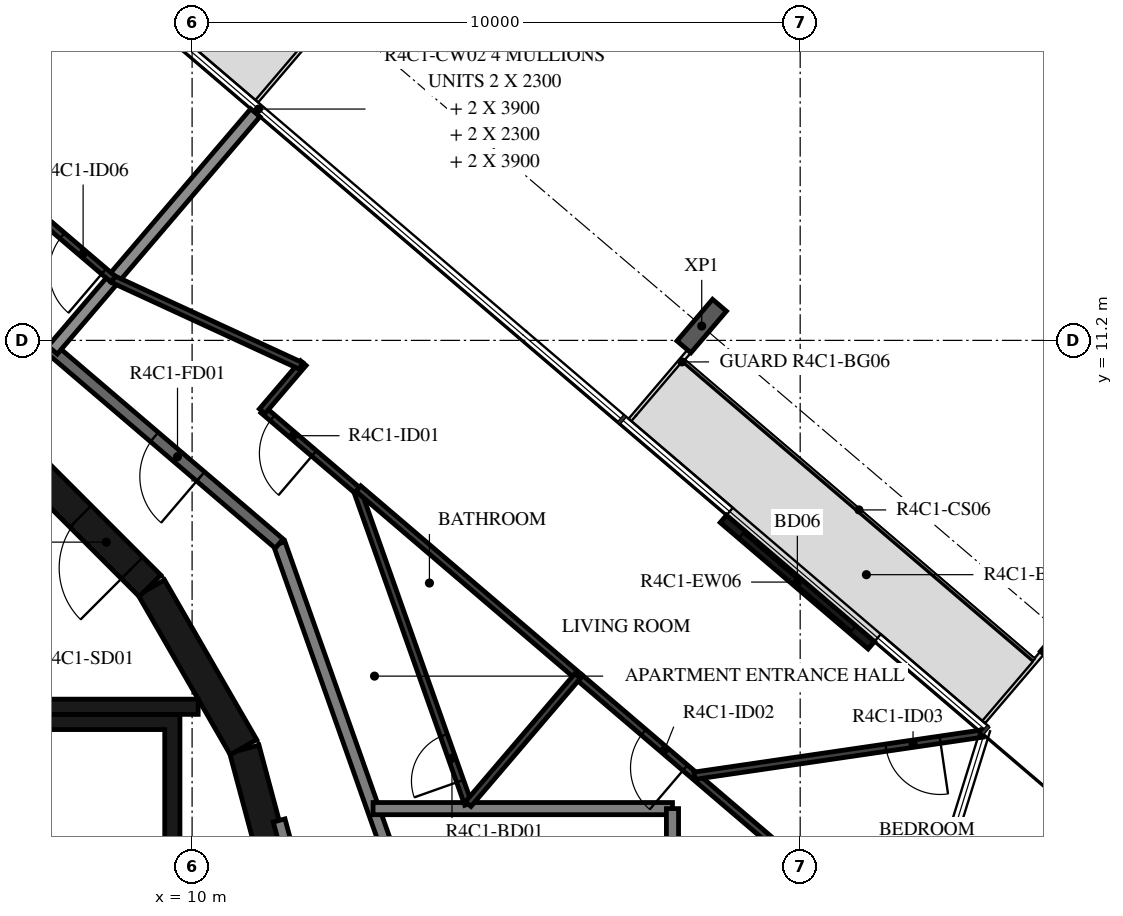
"""IFC4 building model, lengths in metres.
Left out: names, types, materials, properties, quantities, classifications, styles, units other than length and angle.
Written with IfcOpenShell. Run it as: python <this file> out.ifc"""

import sys

from ifc_helpers import new_model, si_unit, direction, frame, frame_2d, origin, origin_2d, place, context, subcontext, project, spatial, polyline, rectangle, i_section, outline, extrude, element, fill, save


model = new_model("IFC4")
c1 = context("Model", 3, precision=1e-05, world=origin(), true_north=direction((0.0, 1.0)))
c2 = subcontext(c1, "Body", "Model", "MODEL_VIEW")
j1 = project(units=[si_unit("LENGTHUNIT", "METRE"), si_unit("PLANEANGLEUNIT", "RADIAN")], contexts=[c1])
p1 = place(None, origin())
s1 = spatial("IfcSite", under=j1, at=p1, CompositionType="ELEMENT")
p2 = place(p1, origin())
s2 = spatial("IfcBuilding", under=s1, at=p2, CompositionType="ELEMENT")
p3 = place(p2, frame((0.0, 0.0, 176.2)))
s3 = spatial("IfcBuildingStorey", under=s2, at=p3, CompositionType="ELEMENT", Elevation=176.2)
for number, where, z_axis, x_axis in (
    (1, (24.358, 6.331, -0.38), (0.0, 0.0, 1.0), (0.76, -0.649, 0.0)),
    (2, (18.381, 11.436, -0.38), (0.0, 0.0, 1.0), (0.76, -0.649, 0.0)),
):
    element("IfcColumn", number, at=place(p3, frame(where, z_axis=z_axis, x_axis=x_axis)), inside=s3, PredefinedType="COLUMN", context=c2, shape_type="SweptSolid", body=[
        extrude(i_section(OverallWidth=0.3, OverallDepth=0.9, WebThickness=0.019, FlangeThickness=0.035, FilletRadius=0.03, at=origin_2d()), origin(), (0.0, 0.0, 1.0), 3.5),
    ])
p4 = place(p3, frame((21.17, 6.186, 0.0), z_axis=(0.0, 0.0, 1.0), x_axis=(-0.760359548534, 0.649502391799, 0.0)))
e3 = element("IfcWall", 3, at=p4, inside=s3, PredefinedType="STANDARD", context=c2, shape_type="SweptSolid", body=[
    extrude(rectangle(XDim=3.2, YDim=0.16, at=frame_2d((1.6, 0.0))), origin(), (0.0, 0.0, 1.0), 3.12),
])
p5 = place(p4, frame((0.4, 0.0, 0.0)))
e4 = element("IfcOpeningElement", 4, at=p5, cuts=e3, PredefinedType="OPENING", context=c2, shape_type="SweptSolid", body=[
    extrude(rectangle(XDim=2.4, YDim=2.4, at=frame_2d((1.2, 1.2))), frame((0.0, 0.09, 0.0), z_axis=(0.0, -1.0, 0.0), x_axis=(1.0, 0.0, 0.0)), (0.0, 0.0, 1.0), 0.18),
])
for number, where, z_axis, x_axis in (
    (5, (11.643, 1.55, 0.0), (0.0, 0.0, 1.0), (-0.259, 0.966, 0.0)),
    (6, (10.845, 4.51, 0.0), (0.0, 0.0, 1.0), (-0.5, 0.866, 0.0)),
):
    element("IfcWall", number, at=place(p3, frame(where, z_axis=z_axis, x_axis=x_axis)), inside=s3, PredefinedType="SHEAR", context=c2, shape_type="SweptSolid", body=[
        extrude(rectangle(XDim=3.033, YDim=0.5, at=frame_2d((1.516, 0.0))), origin(), (0.0, 0.0, 1.0), 3.12),
    ])
p6 = place(p3, frame((9.308, 7.164, 0.0), z_axis=(0.0, 0.0, 1.0), x_axis=(-0.707106781187, 0.707106781187, 0.0)))
e7 = element("IfcWall", 7, at=p6, inside=s3, PredefinedType="SHEAR", context=c2, shape_type="SweptSolid", body=[
    extrude(rectangle(XDim=3.032, YDim=0.5, at=frame_2d((1.516, 0.0))), origin(), (0.0, 0.0, 1.0), 3.12),
])
p7 = place(p6, frame((0.416, 0.0, 0.0)))
e8 = element("IfcOpeningElement", 8, at=p7, cuts=e7, PredefinedType="OPENING", context=c2, shape_type="SweptSolid", body=[
    extrude(rectangle(XDim=1.2, YDim=2.1, at=frame_2d((0.6, 1.05))), frame((0.0, 0.26, 0.0), z_axis=(0.0, -1.0, 0.0), x_axis=(1.0, 0.0, 0.0)), (0.0, 0.0, 1.0), 0.52),
])
p8 = place(p3, frame((7.0, 5.175, 0.0), z_axis=(0.0, 0.0, 1.0), x_axis=(1.0, 0.0, 0.0)))
e9 = element("IfcWall", 9, at=p8, inside=s3, PredefinedType="SHEAR", context=c2, shape_type="SweptSolid", body=[
    extrude(rectangle(XDim=3.1, YDim=0.25, at=frame_2d((1.55, 0.0))), origin(), (0.0, 0.0, 1.0), 3.12),
])
p9 = place(p3, origin())
e10 = element("IfcWall", 10, at=p9, inside=s3, PredefinedType="SHEAR", context=c2, shape_type="SweptSolid", body=[
    extrude(outline(polyline([(-9.55, 4.8), (-1.2, 4.8), (-1.2, 1.9), (-0.95, 1.9), (-0.95, 4.8), (0.95, 4.8), (0.95, 1.9), (1.2, 1.9), (1.2, 4.8), (3.1, 4.8), (3.1, 1.9), (3.35, 1.9), (3.35, 4.8), (5.25, 4.8), (5.25, 1.9), (5.5, 1.9), (5.5, 4.8), (7.4, 4.8), (7.4, 1.9), (7.65, 1.9), (7.65, 4.8), (9.55, 4.8), (9.55, 1.9), (9.8, 1.9), (9.8, 4.8), (9.8, 5.05), (-9.8, 5.05), (-9.8, 4.8), (-9.8, 1.9), (-9.55, 1.9), (-9.55, 4.8)])), origin(), (0.0, 0.0, 1.0), 3.12),
])
p10 = place(p3, frame((11.87, 1.668, 0.0), z_axis=(0.0, 0.0, 1.0), x_axis=(-0.258836880648, 0.965921047093, 0.0)))
e11 = element("IfcWall", 11, at=p10, inside=s3, PredefinedType="STANDARD", context=c2, shape_type="SweptSolid", body=[
    extrude(rectangle(XDim=1.695, YDim=0.2, at=frame_2d((0.848, 0.0))), origin(), (0.0, 0.0, 1.0), 3.12),
])
p11 = place(p3, frame((13.542, 1.903, 0.0), z_axis=(0.0, 0.0, 1.0), x_axis=(-0.333808508206, 0.942640907159, 0.0)))
e12 = element("IfcWall", 12, at=p11, inside=s3, PredefinedType="STANDARD", context=c2, shape_type="SweptSolid", body=[
    extrude(rectangle(XDim=6.317, YDim=0.2, at=frame_2d((3.158, 0.0))), origin(), (0.0, 0.0, 1.0), 3.12),
])
p12 = place(p3, frame((11.433, 7.858, 0.0), z_axis=(0.0, 0.0, 1.0), x_axis=(-0.760412154545, 0.649440801937, 0.0)))
e13 = element("IfcWall", 13, at=p12, inside=s3, PredefinedType="STANDARD", context=c2, shape_type="SweptSolid", body=[
    extrude(rectangle(XDim=7.181, YDim=0.2, at=frame_2d((3.59, 0.0))), origin(), (0.0, 0.0, 1.0), 3.12),
])
p13 = place(p12, frame((1.7, 0.0, 0.0)))
e14 = element("IfcOpeningElement", 14, at=p13, cuts=e13, PredefinedType="OPENING", context=c2, shape_type="SweptSolid", body=[
    extrude(rectangle(XDim=1.0, YDim=2.1, at=frame_2d((0.5, 1.05))), frame((0.0, 0.11, 0.0), z_axis=(0.0, -1.0, 0.0), x_axis=(1.0, 0.0, 0.0)), (0.0, 0.0, 1.0), 0.22),
])
p14 = place(p12, frame((5.101, 0.0, 0.0)))
e15 = element("IfcOpeningElement", 15, at=p14, cuts=e13, PredefinedType="OPENING", context=c2, shape_type="SweptSolid", body=[
    extrude(rectangle(XDim=1.0, YDim=2.1, at=frame_2d((0.5, 1.05))), frame((0.0, 0.11, 0.0), z_axis=(0.0, -1.0, 0.0), x_axis=(1.0, 0.0, 0.0)), (0.0, 0.0, 1.0), 0.22),
])
p15 = place(p3, frame((17.9, 3.5, 0.0), z_axis=(0.0, 0.0, 1.0), x_axis=(-1.0, 0.0, 0.0)))
e16 = element("IfcWall", 16, at=p15, inside=s3, PredefinedType="STANDARD", context=c2, shape_type="SweptSolid", body=[
    extrude(rectangle(XDim=4.924, YDim=0.2, at=frame_2d((2.462, 0.0))), origin(), (0.0, 0.0, 1.0), 3.12),
])
p16 = place(p3, frame((17.9, -3.318, 0.0), z_axis=(0.0, 0.0, 1.0), x_axis=(0.0, 1.0, 0.0)))
e17 = element("IfcWall", 17, at=p16, inside=s3, PredefinedType="STANDARD", context=c2, shape_type="SweptSolid", body=[
    extrude(rectangle(XDim=6.818, YDim=0.2, at=frame_2d((3.409, 0.0))), origin(), (0.0, 0.0, 1.0), 3.12),
])
p17 = place(p3, frame((11.04, 14.943, 0.0), z_axis=(0.0, 0.0, 1.0), x_axis=(-0.649442880087, -0.760410379666, 0.0)))
e18 = element("IfcWall", 18, at=p17, inside=s3, PredefinedType="STANDARD", context=c2, shape_type="SweptSolid", body=[
    extrude(rectangle(XDim=5.133, YDim=0.2, at=frame_2d((2.566, 0.0))), origin(), (0.0, 0.0, 1.0), 2.73),
])
p18 = place(p3, frame((14.541, 3.575, 0.0), z_axis=(0.0, 0.0, 1.0), x_axis=(-0.333799280318, 0.942644174893, 0.0)))
e19 = element("IfcWall", 19, at=p18, inside=s3, PredefinedType="PARTITIONING", context=c2, shape_type="SweptSolid", body=[
    extrude(rectangle(XDim=5.477, YDim=0.12, at=frame_2d((2.738, 0.0))), origin(), (0.0, 0.0, 1.0), 3.12),
])
p19 = place(p18, frame((0.4, 0.0, 0.0)))
e20 = element("IfcOpeningElement", 20, at=p19, cuts=e19, PredefinedType="OPENING", context=c2, shape_type="SweptSolid", body=[
    extrude(rectangle(XDim=0.8, YDim=2.1, at=frame_2d((0.4, 1.05))), frame((0.0, 0.07, 0.0), z_axis=(0.0, -1.0, 0.0), x_axis=(1.0, 0.0, 0.0)), (0.0, 0.0, 1.0), 0.14),
])
p20 = place(p3, frame((12.713, 8.737, 0.0), z_axis=(0.0, 0.0, 1.0), x_axis=(-0.760410825807, 0.649442357716, 0.0)))
e21 = element("IfcWall", 21, at=p20, inside=s3, PredefinedType="PARTITIONING", context=c2, shape_type="SweptSolid", body=[
    extrude(rectangle(XDim=2.029, YDim=0.12, at=frame_2d((1.014, 0.0))), origin(), (0.0, 0.0, 1.0), 3.12),
])
p21 = place(p20, frame((0.929, 0.0, 0.0)))
e22 = element("IfcOpeningElement", 22, at=p21, cuts=e21, PredefinedType="OPENING", context=c2, shape_type="SweptSolid", body=[
    extrude(rectangle(XDim=0.9, YDim=2.1, at=frame_2d((0.45, 1.05))), frame((0.0, 0.07, 0.0), z_axis=(0.0, -1.0, 0.0), x_axis=(1.0, 0.0, 0.0)), (0.0, 0.0, 1.0), 0.14),
])
p22 = place(p3, frame((12.734, 8.762, 0.0), z_axis=(0.0, 0.0, 1.0), x_axis=(0.760390484255, -0.649466174219, 0.0)))
e23 = element("IfcWall", 23, at=p22, inside=s3, PredefinedType="PARTITIONING", context=c2, shape_type="SweptSolid", body=[
    extrude(rectangle(XDim=4.783, YDim=0.12, at=frame_2d((2.391, 0.0))), origin(), (0.0, 0.0, 1.0), 3.12),
])
p23 = place(p3, frame((11.153, 10.034, 0.0), z_axis=(0.0, 0.0, 1.0), x_axis=(0.649381401329, 0.760462882466, 0.0)))
e24 = element("IfcWall", 24, at=p23, inside=s3, PredefinedType="PARTITIONING", context=c2, shape_type="SweptSolid", body=[
    extrude(rectangle(XDim=1.042, YDim=0.12, at=frame_2d((0.521, 0.0))), origin(), (0.0, 0.0, 1.0), 3.12),
])
p24 = place(p3, frame((11.79, 10.781, 0.0), z_axis=(0.0, 0.0, 1.0), x_axis=(-0.907999296286, 0.418971691101, 0.0)))
e25 = element("IfcWall", 25, at=p24, inside=s3, PredefinedType="PARTITIONING", context=c2, shape_type="SweptSolid", body=[
    extrude(rectangle(XDim=3.401, YDim=0.12, at=frame_2d((1.701, 0.0))), origin(), (0.0, 0.0, 1.0), 3.12),
])
p25 = place(p3, frame((23.411, -0.357, 0.0), z_axis=(0.0, 0.0, 1.0), x_axis=(-0.76041871148, 0.649433124525, 0.0)))
e26 = element("IfcWall", 26, at=p25, inside=s3, PredefinedType="PARTITIONING", context=c2, shape_type="SweptSolid", body=[
    extrude(rectangle(XDim=9.259, YDim=0.12, at=frame_2d((4.629, 0.0))), origin(), (0.0, 0.0, 1.0), 3.12),
])
p26 = place(p25, frame((6.972, 0.0, 0.0)))
e27 = element("IfcOpeningElement", 27, at=p26, cuts=e26, PredefinedType="OPENING", context=c2, shape_type="SweptSolid", body=[
    extrude(rectangle(XDim=0.9, YDim=2.1, at=frame_2d((0.45, 1.05))), frame((0.0, 0.07, 0.0), z_axis=(0.0, -1.0, 0.0), x_axis=(1.0, 0.0, 0.0)), (0.0, 0.0, 1.0), 0.14),
])
p27 = place(p25, frame((0.2, 0.0, 0.0)))
e28 = element("IfcOpeningElement", 28, at=p27, cuts=e26, PredefinedType="OPENING", context=c2, shape_type="SweptSolid", body=[
    extrude(rectangle(XDim=0.9, YDim=2.1, at=frame_2d((0.45, 1.05))), frame((0.0, 0.07, 0.0), z_axis=(0.0, -1.0, 0.0), x_axis=(1.0, 0.0, 0.0)), (0.0, 0.0, 1.0), 0.14),
])
p28 = place(p3, frame((16.341, 5.682, 0.0), z_axis=(0.0, 0.0, 1.0), x_axis=(-0.64946993237, -0.76038727432, 0.0)))
e29 = element("IfcWall", 29, at=p28, inside=s3, PredefinedType="PARTITIONING", context=c2, shape_type="SweptSolid", body=[
    extrude(rectangle(XDim=2.771, YDim=0.12, at=frame_2d((1.386, 0.0))), origin(), (0.0, 0.0, 1.0), 3.12),
])
p29 = place(p3, frame((22.994, 4.734, 0.0), z_axis=(0.0, 0.0, 1.0), x_axis=(-0.989449286977, -0.144879634529, 0.0)))
e30 = element("IfcWall", 30, at=p29, inside=s3, PredefinedType="PARTITIONING", context=c2, shape_type="SweptSolid", body=[
    extrude(rectangle(XDim=4.782, YDim=0.12, at=frame_2d((2.391, 0.0))), origin(), (0.0, 0.0, 1.0), 3.12),
])
p30 = place(p29, frame((0.7, 0.0, 0.0)))
e31 = element("IfcOpeningElement", 31, at=p30, cuts=e30, PredefinedType="OPENING", context=c2, shape_type="SweptSolid", body=[
    extrude(rectangle(XDim=0.9, YDim=2.1, at=frame_2d((0.45, 1.05))), frame((0.0, 0.07, 0.0), z_axis=(0.0, -1.0, 0.0), x_axis=(1.0, 0.0, 0.0)), (0.0, 0.0, 1.0), 0.14),
])
p31 = place(p3, frame((8.702, 12.206, 0.0), z_axis=(0.0, 0.0, 1.0), x_axis=(-0.760401313718, 0.649453494945, 0.0)))
e32 = element("IfcWall", 32, at=p31, inside=s3, PredefinedType="PARTITIONING", context=c2, shape_type="SweptSolid", body=[
    extrude(rectangle(XDim=16.724, YDim=0.12, at=frame_2d((8.362, 0.0))), origin(), (0.0, 0.0, 1.0), 3.12),
])
p32 = place(p31, frame((0.2, 0.0, 0.0)))
e33 = element("IfcOpeningElement", 33, at=p32, cuts=e32, PredefinedType="OPENING", context=c2, shape_type="SweptSolid", body=[
    extrude(rectangle(XDim=0.9, YDim=2.1, at=frame_2d((0.45, 1.05))), frame((0.0, 0.07, 0.0), z_axis=(0.0, -1.0, 0.0), x_axis=(1.0, 0.0, 0.0)), (0.0, 0.0, 1.0), 0.14),
])
p33 = place(p31, frame((8.02, 0.0, 0.0)))
e34 = element("IfcOpeningElement", 34, at=p33, cuts=e32, PredefinedType="OPENING", context=c2, shape_type="SweptSolid", body=[
    extrude(rectangle(XDim=0.9, YDim=2.1, at=frame_2d((0.45, 1.05))), frame((0.0, 0.07, 0.0), z_axis=(0.0, -1.0, 0.0), x_axis=(1.0, 0.0, 0.0)), (0.0, 0.0, 1.0), 0.14),
])
p34 = place(p31, frame((14.412, 0.0, 0.0)))
e35 = element("IfcOpeningElement", 35, at=p34, cuts=e32, PredefinedType="OPENING", context=c2, shape_type="SweptSolid", body=[
    extrude(rectangle(XDim=0.9, YDim=2.1, at=frame_2d((0.45, 1.05))), frame((0.0, 0.07, 0.0), z_axis=(0.0, -1.0, 0.0), x_axis=(1.0, 0.0, 0.0)), (0.0, 0.0, 1.0), 0.14),
])
p35 = place(p5, origin())
e36 = element("IfcDoor", 36, at=p35, inside=s3, OperationType="DOUBLE_DOOR_SLIDING", PredefinedType="DOOR", context=c2, shape_type="SweptSolid", body=[
    extrude(rectangle(XDim=2.4, YDim=2.4, at=frame_2d((1.2, 1.2))), frame((0.0, 0.025, 0.0), z_axis=(0.0, -1.0, 0.0), x_axis=(1.0, 0.0, 0.0)), (0.0, 0.0, 1.0), 0.05),
])
fill(e4, e36)
p36 = place(p7, origin())
e37 = element("IfcDoor", 37, at=p36, inside=s3, OperationType="SINGLE_SWING_RIGHT", PredefinedType="DOOR", context=c2, shape_type="SweptSolid", body=[
    extrude(rectangle(XDim=1.2, YDim=2.1, at=frame_2d((0.6, 1.05))), frame((0.0, 0.025, 0.0), z_axis=(0.0, -1.0, 0.0), x_axis=(1.0, 0.0, 0.0)), (0.0, 0.0, 1.0), 0.05),
])
fill(e8, e37)
p37 = place(p13, origin())
e38 = element("IfcDoor", 38, at=p37, inside=s3, OperationType="SINGLE_SWING_LEFT", PredefinedType="DOOR", context=c2, shape_type="SweptSolid", body=[
    extrude(rectangle(XDim=1.0, YDim=2.1, at=frame_2d((0.5, 1.05))), frame((0.0, 0.025, 0.0), z_axis=(0.0, -1.0, 0.0), x_axis=(1.0, 0.0, 0.0)), (0.0, 0.0, 1.0), 0.05),
])
fill(e14, e38)
p38 = place(p19, origin())
e39 = element("IfcDoor", 39, at=p38, inside=s3, OperationType="SINGLE_SWING_LEFT", PredefinedType="DOOR", context=c2, shape_type="SweptSolid", body=[
    extrude(rectangle(XDim=0.8, YDim=2.1, at=frame_2d((0.4, 1.05))), frame((0.0, 0.025, 0.0), z_axis=(0.0, -1.0, 0.0), x_axis=(1.0, 0.0, 0.0)), (0.0, 0.0, 1.0), 0.05),
])
fill(e20, e39)
p39 = place(p21, origin())
e40 = element("IfcDoor", 40, at=p39, inside=s3, OperationType="SINGLE_SWING_LEFT", PredefinedType="DOOR", context=c2, shape_type="SweptSolid", body=[
    extrude(rectangle(XDim=0.9, YDim=2.1, at=frame_2d((0.45, 1.05))), frame((0.0, 0.025, 0.0), z_axis=(0.0, -1.0, 0.0), x_axis=(1.0, 0.0, 0.0)), (0.0, 0.0, 1.0), 0.05),
])
fill(e22, e40)
p40 = place(p26, origin())
e41 = element("IfcDoor", 41, at=p40, inside=s3, OperationType="SINGLE_SWING_RIGHT", PredefinedType="DOOR", context=c2, shape_type="SweptSolid", body=[
    extrude(rectangle(XDim=0.9, YDim=2.1, at=frame_2d((0.45, 1.05))), frame((0.0, 0.025, 0.0), z_axis=(0.0, -1.0, 0.0), x_axis=(1.0, 0.0, 0.0)), (0.0, 0.0, 1.0), 0.05),
])
fill(e27, e41)
p41 = place(p30, origin())
e42 = element("IfcDoor", 42, at=p41, inside=s3, OperationType="SINGLE_SWING_LEFT", PredefinedType="DOOR", context=c2, shape_type="SweptSolid", body=[
    extrude(rectangle(XDim=0.9, YDim=2.1, at=frame_2d((0.45, 1.05))), frame((0.0, 0.025, 0.0), z_axis=(0.0, -1.0, 0.0), x_axis=(1.0, 0.0, 0.0)), (0.0, 0.0, 1.0), 0.05),
])
fill(e31, e42)
p42 = place(p32, origin())
e43 = element("IfcDoor", 43, at=p42, inside=s3, OperationType="SINGLE_SWING_RIGHT", PredefinedType="DOOR", context=c2, shape_type="SweptSolid", body=[
    extrude(rectangle(XDim=0.9, YDim=2.1, at=frame_2d((0.45, 1.05))), frame((0.0, 0.025, 0.0), z_axis=(0.0, -1.0, 0.0), x_axis=(1.0, 0.0, 0.0)), (0.0, 0.0, 1.0), 0.05),
])
fill(e33, e43)
save(model, sys.argv[1])
